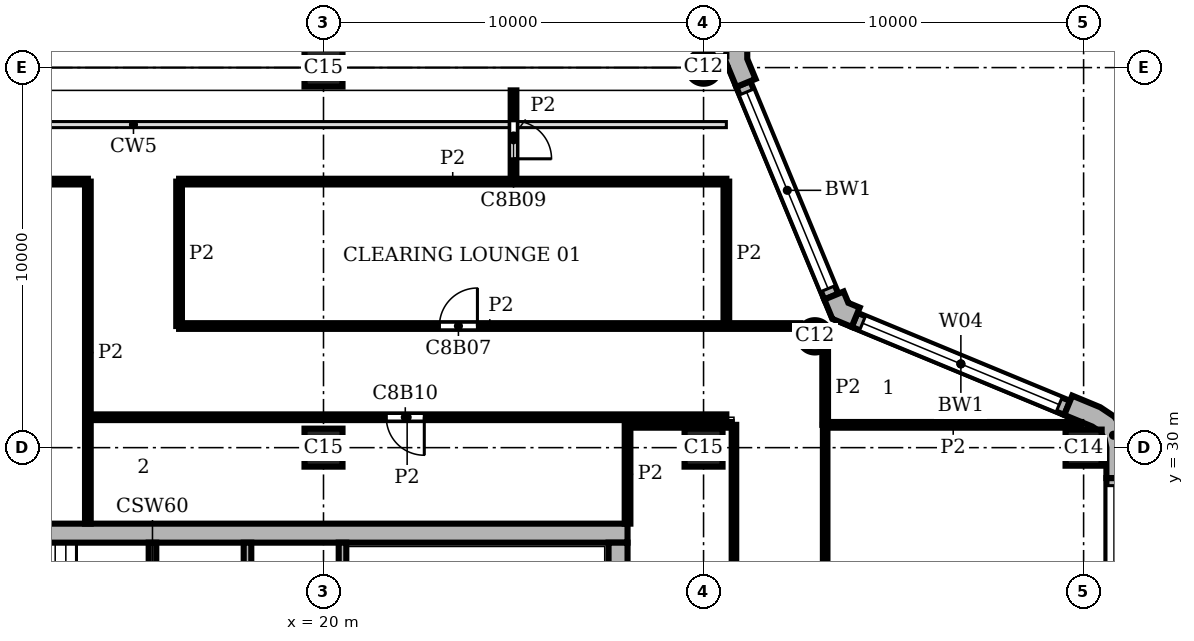
"""IFC4 building model, lengths in metres.
Left out: names, types, materials, properties, quantities, classifications, styles, units other than length and angle.
Written with IfcOpenShell. Run it as: python <this file> out.ifc"""

import sys

from ifc_helpers import new_model, si_unit, direction, frame, frame_2d, origin, origin_2d, place, context, subcontext, project, spatial, polyline, rectangle, circle, outline, extrude, element, fill, save


model = new_model("IFC4")
c1 = context("Model", 3, precision=1e-05, world=origin(), true_north=direction((0.0, 1.0)))
c2 = subcontext(c1, "Body", "Model", "MODEL_VIEW")
j1 = project(units=[si_unit("LENGTHUNIT", "METRE"), si_unit("PLANEANGLEUNIT", "RADIAN")], contexts=[c1])
p1 = place(None, origin())
s1 = spatial("IfcSite", under=j1, at=p1, CompositionType="ELEMENT")
p2 = place(p1, origin())
s2 = spatial("IfcBuilding", under=s1, at=p2, CompositionType="ELEMENT")
p3 = place(p2, frame((0.0, 0.0, 329.4)))
s3 = spatial("IfcBuildingStorey", under=s2, at=p3, CompositionType="ELEMENT", Elevation=329.4)
p4 = place(p3, frame((40.0, 30.0, 0.0), z_axis=(0.0, 0.0, 1.0), x_axis=(1.0, 0.0, 0.0)))
e1 = element("IfcColumn", 1, at=p4, inside=s3, PredefinedType="COLUMN", context=c2, shape_type="SweptSolid", body=[
    extrude(rectangle(XDim=0.95, YDim=0.95, at=origin_2d()), origin(), (0.0, 0.0, 1.0), 3.9),
])
for number, where, z_axis, x_axis in (
    (2, (32.929, 32.929, 0.0), (0.0, 0.0, 1.0), (1.0, 0.0, 0.0)),
    (3, (30.0, 40.0, 0.0), (0.0, 0.0, 1.0), (1.0, 0.0, 0.0)),
):
    element("IfcColumn", number, at=place(p3, frame(where, z_axis=z_axis, x_axis=x_axis)), inside=s3, PredefinedType="COLUMN", context=c2, shape_type="SweptSolid", body=[
        extrude(circle(Radius=0.425, at=origin_2d()), origin(), (0.0, 0.0, 1.0), 3.9),
    ])
for number, where, z_axis, x_axis in (
    (4, (20.0, 30.0, 0.0), (0.0, 0.0, 1.0), (1.0, 0.0, 0.0)),
    (5, (20.0, 40.0, 0.0), (0.0, 0.0, 1.0), (1.0, 0.0, 0.0)),
    (6, (30.0, 30.0, 0.0), (0.0, 0.0, 1.0), (1.0, 0.0, 0.0)),
):
    element("IfcColumn", number, at=place(p3, frame(where, z_axis=z_axis, x_axis=x_axis)), inside=s3, PredefinedType="COLUMN", context=c2, shape_type="SweptSolid", body=[
        extrude(rectangle(XDim=1.0, YDim=1.0, at=origin_2d()), origin(), (0.0, 0.0, 1.0), 3.9),
    ])
p5 = place(p3, frame((27.75, 8.5, 0.0), z_axis=(0.0, 0.0, 1.0), x_axis=(0.0, 1.0, 0.0)))
e7 = element("IfcWall", 7, at=p5, inside=s3, PredefinedType="SHEAR", context=c2, shape_type="SweptSolid", body=[
    extrude(rectangle(XDim=19.0, YDim=0.5, at=frame_2d((9.5, 0.0))), origin(), (0.0, 0.0, 1.0), 3.9),
])
p6 = place(p5, frame((4.95, 0.0, 0.0)))
e8 = element("IfcOpeningElement", 8, at=p6, cuts=e7, PredefinedType="OPENING", context=c2, shape_type="SweptSolid", body=[
    extrude(rectangle(XDim=1.6, YDim=2.1, at=frame_2d((0.8, 1.05))), frame((0.0, 0.26, 0.0), z_axis=(0.0, -1.0, 0.0), x_axis=(1.0, 0.0, 0.0)), (0.0, 0.0, 1.0), 0.52),
])
p7 = place(p3, frame((28.0, 27.75, 0.0), z_axis=(0.0, 0.0, 1.0), x_axis=(-1.0, 0.0, 0.0)))
e9 = element("IfcWall", 9, at=p7, inside=s3, PredefinedType="SHEAR", context=c2, shape_type="SweptSolid", body=[
    extrude(rectangle(XDim=20.0, YDim=0.5, at=frame_2d((10.0, 0.0))), origin(), (0.0, 0.0, 1.0), 3.9),
])
p8 = place(p3, origin())
e10 = element("IfcWall", 10, at=p8, inside=s3, PredefinedType="SOLIDWALL", context=c2, shape_type="SweptSolid", body=[
    extrude(outline(polyline([(41.0, 29.2), (41.15, 29.2), (41.15, 30.0), (41.062, 30.44), (40.813, 30.813), (40.44, 31.062), (39.701, 31.369), (39.644, 31.23), (39.49, 30.861), (40.229, 30.554), (40.424, 30.424), (40.554, 30.229), (40.6, 30.0), (40.6, 29.2), (41.0, 29.2)])), origin(), (0.0, 0.0, 1.0), 3.9),
])
e11 = element("IfcWall", 11, at=p8, inside=s3, PredefinedType="SOLIDWALL", context=c2, shape_type="SweptSolid", body=[
    extrude(outline(polyline([(34.051, 33.547), (34.108, 33.685), (33.809, 33.809), (33.685, 34.108), (33.547, 34.051), (33.177, 33.898), (33.388, 33.388), (33.898, 33.177), (34.051, 33.547)])), origin(), (0.0, 0.0, 1.0), 3.9),
])
e12 = element("IfcWall", 12, at=p8, inside=s3, PredefinedType="SOLIDWALL", context=c2, shape_type="SweptSolid", body=[
    extrude(outline(polyline([(30.62, 39.995), (30.62, 40.071), (30.861, 39.49), (31.23, 39.644), (31.369, 39.701), (31.15, 40.229), (31.15, 40.8), (31.0, 40.8), (30.6, 40.8), (30.6, 40.295), (30.425, 40.295), (30.425, 39.995), (30.62, 39.995)])), origin(), (0.0, 0.0, 1.0), 3.9),
])
p9 = place(p3, frame((40.8, 0.8, 0.0), z_axis=(0.0, 0.0, 1.0), x_axis=(0.0, 1.0, 0.0)))
e13 = element("IfcWall", 13, at=p9, inside=s3, PredefinedType="SOLIDWALL", context=c2, shape_type="SweptSolid", body=[
    extrude(rectangle(XDim=28.4, YDim=0.4, at=frame_2d((14.2, 0.0))), origin(), (0.0, 0.0, 1.0), 3.9),
])
p10 = place(p9, frame((0.2, 0.0, 0.9)))
e14 = element("IfcOpeningElement", 14, at=p10, cuts=e13, PredefinedType="OPENING", context=c2, shape_type="SweptSolid", body=[
    extrude(rectangle(XDim=8.0, YDim=2.35, at=frame_2d((4.0, 1.175))), frame((0.0, 0.21, 0.0), z_axis=(0.0, -1.0, 0.0), x_axis=(1.0, 0.0, 0.0)), (0.0, 0.0, 1.0), 0.42),
])
p11 = place(p9, frame((10.2, 0.0, 0.9)))
e15 = element("IfcOpeningElement", 15, at=p11, cuts=e13, PredefinedType="OPENING", context=c2, shape_type="SweptSolid", body=[
    extrude(rectangle(XDim=8.0, YDim=2.35, at=frame_2d((4.0, 1.175))), frame((0.0, 0.21, 0.0), z_axis=(0.0, -1.0, 0.0), x_axis=(1.0, 0.0, 0.0)), (0.0, 0.0, 1.0), 0.42),
])
p12 = place(p9, frame((20.2, 0.0, 0.9)))
e16 = element("IfcOpeningElement", 16, at=p12, cuts=e13, PredefinedType="OPENING", context=c2, shape_type="SweptSolid", body=[
    extrude(rectangle(XDim=8.0, YDim=2.35, at=frame_2d((4.0, 1.175))), frame((0.0, 0.21, 0.0), z_axis=(0.0, -1.0, 0.0), x_axis=(1.0, 0.0, 0.0)), (0.0, 0.0, 1.0), 0.42),
])
p13 = place(p3, frame((39.567, 31.045, 0.0), z_axis=(0.0, 0.0, 1.0), x_axis=(-0.923891000409, 0.382655745237, 0.0)))
e17 = element("IfcWall", 17, at=p13, inside=s3, PredefinedType="SOLIDWALL", context=c2, shape_type="SweptSolid", body=[
    extrude(rectangle(XDim=6.053, YDim=0.4, at=frame_2d((3.027, 0.0))), origin(), (0.0, 0.0, 1.0), 3.9),
])
p14 = place(p13, frame((0.227, 0.0, 0.9)))
e18 = element("IfcOpeningElement", 18, at=p14, cuts=e17, PredefinedType="OPENING", context=c2, shape_type="SweptSolid", body=[
    extrude(rectangle(XDim=5.6, YDim=2.35, at=frame_2d((2.8, 1.175))), frame((0.0, 0.21, 0.0), z_axis=(0.0, -1.0, 0.0), x_axis=(1.0, 0.0, 0.0)), (0.0, 0.0, 1.0), 0.42),
])
p15 = place(p3, frame((33.362, 33.974, 0.0), z_axis=(0.0, 0.0, 1.0), x_axis=(-0.382655745237, 0.923891000409, 0.0)))
e19 = element("IfcWall", 19, at=p15, inside=s3, PredefinedType="SOLIDWALL", context=c2, shape_type="SweptSolid", body=[
    extrude(rectangle(XDim=6.053, YDim=0.4, at=frame_2d((3.027, 0.0))), origin(), (0.0, 0.0, 1.0), 3.9),
])
p16 = place(p15, frame((0.227, 0.0, 0.9)))
e20 = element("IfcOpeningElement", 20, at=p16, cuts=e19, PredefinedType="OPENING", context=c2, shape_type="SweptSolid", body=[
    extrude(rectangle(XDim=5.6, YDim=2.35, at=frame_2d((2.8, 1.175))), frame((0.0, 0.21, 0.0), z_axis=(0.0, -1.0, 0.0), x_axis=(1.0, 0.0, 0.0)), (0.0, 0.0, 1.0), 0.42),
])
p17 = place(p3, frame((15.5, 23.6, 0.0), z_axis=(0.0, 0.0, 1.0), x_axis=(0.0, 1.0, 0.0)))
e21 = element("IfcWall", 21, at=p17, inside=s3, PredefinedType="SHEAR", context=c2, shape_type="SweptSolid", body=[
    extrude(rectangle(XDim=3.9, YDim=0.2, at=frame_2d((1.95, 0.0))), origin(), (0.0, 0.0, 1.0), 3.45),
])
p18 = place(p3, frame((18.0, 20.0, 0.0), z_axis=(0.0, 0.0, 1.0), x_axis=(0.0, 1.0, 0.0)))
e22 = element("IfcWall", 22, at=p18, inside=s3, PredefinedType="SHEAR", context=c2, shape_type="SweptSolid", body=[
    extrude(rectangle(XDim=7.5, YDim=0.2, at=frame_2d((3.75, 0.0))), origin(), (0.0, 0.0, 1.0), 3.45),
])
p19 = place(p18, frame((1.2, 0.0, 0.0)))
e23 = element("IfcOpeningElement", 23, at=p19, cuts=e22, PredefinedType="OPENING", context=c2, shape_type="SweptSolid", body=[
    extrude(rectangle(XDim=1.2, YDim=2.1, at=frame_2d((0.6, 1.05))), frame((0.0, 0.11, 0.0), z_axis=(0.0, -1.0, 0.0), x_axis=(1.0, 0.0, 0.0)), (0.0, 0.0, 1.0), 0.22),
])
p20 = place(p3, frame((20.5, 23.6, 0.0), z_axis=(0.0, 0.0, 1.0), x_axis=(0.0, 1.0, 0.0)))
e24 = element("IfcWall", 24, at=p20, inside=s3, PredefinedType="SHEAR", context=c2, shape_type="SweptSolid", body=[
    extrude(rectangle(XDim=3.9, YDim=0.2, at=frame_2d((1.95, 0.0))), origin(), (0.0, 0.0, 1.0), 3.45),
])
p21 = place(p3, frame((13.8, 28.0, 0.0), z_axis=(0.0, 0.0, 1.0), x_axis=(0.0, 1.0, 0.0)))
e25 = element("IfcWall", 25, at=p21, inside=s3, PredefinedType="PARTITIONING", context=c2, shape_type="SweptSolid", body=[
    extrude(rectangle(XDim=9.0, YDim=0.15, at=frame_2d((4.5, 0.0))), origin(), (0.0, 0.0, 1.0), 3.45),
])
p22 = place(p3, frame((16.2, 33.2, 0.0), z_axis=(0.0, 0.0, 1.0), x_axis=(0.0, 1.0, 0.0)))
e26 = element("IfcWall", 26, at=p22, inside=s3, PredefinedType="PARTITIONING", context=c2, shape_type="SweptSolid", body=[
    extrude(rectangle(XDim=3.8, YDim=0.15, at=frame_2d((1.9, 0.0))), origin(), (0.0, 0.0, 1.0), 3.45),
])
p23 = place(p3, frame((25.0, 37.0, 0.0), z_axis=(0.0, 0.0, 1.0), x_axis=(0.0, 1.0, 0.0)))
e27 = element("IfcWall", 27, at=p23, inside=s3, PredefinedType="PARTITIONING", context=c2, shape_type="SweptSolid", body=[
    extrude(rectangle(XDim=2.4, YDim=0.15, at=frame_2d((1.2, 0.0))), origin(), (0.0, 0.0, 1.0), 3.45),
])
p24 = place(p23, frame((0.6, 0.0, 0.0)))
e28 = element("IfcOpeningElement", 28, at=p24, cuts=e27, PredefinedType="OPENING", context=c2, shape_type="SweptSolid", body=[
    extrude(rectangle(XDim=1.0, YDim=2.1, at=frame_2d((0.5, 1.05))), frame((0.0, 0.085, 0.0), z_axis=(0.0, -1.0, 0.0), x_axis=(1.0, 0.0, 0.0)), (0.0, 0.0, 1.0), 0.17),
])
p25 = place(p3, frame((28.0, 28.0, 0.0), z_axis=(0.0, 0.0, 1.0), x_axis=(0.0, 1.0, 0.0)))
e29 = element("IfcWall", 29, at=p25, inside=s3, PredefinedType="PARTITIONING", context=c2, shape_type="SweptSolid", body=[
    extrude(rectangle(XDim=2.598, YDim=0.15, at=frame_2d((1.299, 0.0))), origin(), (0.0, 0.0, 1.0), 3.45),
])
p26 = place(p3, frame((30.6, 33.2, 0.0), z_axis=(0.0, 0.0, 1.0), x_axis=(0.0, 1.0, 0.0)))
e30 = element("IfcWall", 30, at=p26, inside=s3, PredefinedType="PARTITIONING", context=c2, shape_type="SweptSolid", body=[
    extrude(rectangle(XDim=3.8, YDim=0.15, at=frame_2d((1.9, 0.0))), origin(), (0.0, 0.0, 1.0), 3.45),
])
p27 = place(p3, frame((33.2, 30.6, 0.0), z_axis=(0.0, 0.0, 1.0), x_axis=(0.0, 1.0, 0.0)))
e31 = element("IfcWall", 31, at=p27, inside=s3, PredefinedType="PARTITIONING", context=c2, shape_type="SweptSolid", body=[
    extrude(rectangle(XDim=1.952, YDim=0.15, at=frame_2d((0.976, 0.0))), origin(), (0.0, 0.0, 1.0), 3.45),
])
p28 = place(p3, frame((28.002, 30.6, 0.0), z_axis=(0.0, 0.0, 1.0), x_axis=(1.0, 0.0, 0.0)))
e32 = element("IfcWall", 32, at=p28, inside=s3, PredefinedType="PARTITIONING", context=c2, shape_type="SweptSolid", body=[
    extrude(rectangle(XDim=2.738, YDim=0.15, at=frame_2d((1.369, 0.0))), origin(), (0.0, 0.0, 1.0), 3.45),
])
p29 = place(p3, frame((33.2, 30.6, 0.0), z_axis=(0.0, 0.0, 1.0), x_axis=(1.0, 0.0, 0.0)))
e33 = element("IfcWall", 33, at=p29, inside=s3, PredefinedType="PARTITIONING", context=c2, shape_type="SweptSolid", body=[
    extrude(rectangle(XDim=6.738, YDim=0.15, at=frame_2d((3.369, 0.0))), origin(), (0.0, 0.0, 1.0), 3.45),
])
p30 = place(p3, frame((13.802, 30.8, 0.0), z_axis=(0.0, 0.0, 1.0), x_axis=(1.0, 0.0, 0.0)))
e34 = element("IfcWall", 34, at=p30, inside=s3, PredefinedType="PARTITIONING", context=c2, shape_type="SweptSolid", body=[
    extrude(rectangle(XDim=16.798, YDim=0.15, at=frame_2d((8.399, 0.0))), origin(), (0.0, 0.0, 1.0), 3.45),
])
p31 = place(p30, frame((7.85, 0.0, 0.0)))
e35 = element("IfcOpeningElement", 35, at=p31, cuts=e34, PredefinedType="OPENING", context=c2, shape_type="SweptSolid", body=[
    extrude(rectangle(XDim=1.0, YDim=2.1, at=frame_2d((0.5, 1.05))), frame((0.0, 0.085, 0.0), z_axis=(0.0, -1.0, 0.0), x_axis=(1.0, 0.0, 0.0)), (0.0, 0.0, 1.0), 0.17),
])
p32 = place(p3, frame((16.2, 33.2, 0.0), z_axis=(0.0, 0.0, 1.0), x_axis=(1.0, 0.0, 0.0)))
e36 = element("IfcWall", 36, at=p32, inside=s3, PredefinedType="PARTITIONING", context=c2, shape_type="SweptSolid", body=[
    extrude(rectangle(XDim=16.352, YDim=0.15, at=frame_2d((8.176, 0.0))), origin(), (0.0, 0.0, 1.0), 3.45),
])
p33 = place(p32, frame((6.85, 0.0, 0.0)))
e37 = element("IfcOpeningElement", 37, at=p33, cuts=e36, PredefinedType="OPENING", context=c2, shape_type="SweptSolid", body=[
    extrude(rectangle(XDim=1.0, YDim=2.1, at=frame_2d((0.5, 1.05))), frame((0.0, 0.085, 0.0), z_axis=(0.0, -1.0, 0.0), x_axis=(1.0, 0.0, 0.0)), (0.0, 0.0, 1.0), 0.17),
])
p34 = place(p3, frame((5.0, 37.0, 0.0), z_axis=(0.0, 0.0, 1.0), x_axis=(1.0, 0.0, 0.0)))
e38 = element("IfcWall", 38, at=p34, inside=s3, PredefinedType="PARTITIONING", context=c2, shape_type="SweptSolid", body=[
    extrude(rectangle(XDim=8.8, YDim=0.15, at=frame_2d((4.4, 0.0))), origin(), (0.0, 0.0, 1.0), 3.45),
])
p35 = place(p34, frame((4.1, 0.0, 0.0)))
e39 = element("IfcOpeningElement", 39, at=p35, cuts=e38, PredefinedType="OPENING", context=c2, shape_type="SweptSolid", body=[
    extrude(rectangle(XDim=1.8, YDim=2.1, at=frame_2d((0.9, 1.05))), frame((0.0, 0.085, 0.0), z_axis=(0.0, -1.0, 0.0), x_axis=(1.0, 0.0, 0.0)), (0.0, 0.0, 1.0), 0.17),
])
p36 = place(p3, frame((16.2, 37.0, 0.0), z_axis=(0.0, 0.0, 1.0), x_axis=(1.0, 0.0, 0.0)))
e40 = element("IfcWall", 40, at=p36, inside=s3, PredefinedType="PARTITIONING", context=c2, shape_type="SweptSolid", body=[
    extrude(rectangle(XDim=14.4, YDim=0.15, at=frame_2d((7.2, 0.0))), origin(), (0.0, 0.0, 1.0), 3.45),
])
p37 = place(p3, frame((30.8, 15.45, 0.0), z_axis=(0.0, 0.0, 1.0), x_axis=(0.0, 1.0, 0.0)))
e41 = element("IfcWall", 41, at=p37, inside=s3, PredefinedType="PARTITIONING", context=c2, shape_type="SweptSolid", body=[
    extrude(rectangle(XDim=15.15, YDim=0.12, at=frame_2d((7.575, 0.0))), origin(), (0.0, 0.0, 1.0), 3.45),
])
p38 = place(p37, frame((7.6, 0.0, 0.0)))
e42 = element("IfcOpeningElement", 42, at=p38, cuts=e41, PredefinedType="OPENING", context=c2, shape_type="SweptSolid", body=[
    extrude(rectangle(XDim=1.0, YDim=2.1, at=frame_2d((0.5, 1.05))), frame((0.0, 0.07, 0.0), z_axis=(0.0, -1.0, 0.0), x_axis=(1.0, 0.0, 0.0)), (0.0, 0.0, 1.0), 0.14),
])
p39 = place(p3, frame((33.2, 8.0, 0.0), z_axis=(0.0, 0.0, 1.0), x_axis=(0.0, 1.0, 0.0)))
e43 = element("IfcWall", 43, at=p39, inside=s3, PredefinedType="PARTITIONING", context=c2, shape_type="SweptSolid", body=[
    extrude(rectangle(XDim=22.6, YDim=0.12, at=frame_2d((11.3, 0.0))), origin(), (0.0, 0.0, 1.0), 3.45),
])
p40 = place(p12, origin())
e44 = element("IfcWindow", 44, at=p40, inside=s3, PartitioningType="SINGLE_PANEL", PredefinedType="WINDOW", context=c2, shape_type="SweptSolid", body=[
    extrude(rectangle(XDim=8.0, YDim=2.35, at=frame_2d((4.0, 1.175))), frame((0.0, 0.16, 0.0), z_axis=(0.0, -1.0, 0.0), x_axis=(1.0, 0.0, 0.0)), (0.0, 0.0, 1.0), 0.06),
])
fill(e16, e44)
p41 = place(p14, origin())
e45 = element("IfcWindow", 45, at=p41, inside=s3, PartitioningType="SINGLE_PANEL", PredefinedType="WINDOW", context=c2, shape_type="SweptSolid", body=[
    extrude(rectangle(XDim=5.6, YDim=2.35, at=frame_2d((2.8, 1.175))), frame((0.0, 0.16, 0.0), z_axis=(0.0, -1.0, 0.0), x_axis=(1.0, 0.0, 0.0)), (0.0, 0.0, 1.0), 0.06),
])
fill(e18, e45)
p42 = place(p16, origin())
e46 = element("IfcWindow", 46, at=p42, inside=s3, PartitioningType="SINGLE_PANEL", PredefinedType="WINDOW", context=c2, shape_type="SweptSolid", body=[
    extrude(rectangle(XDim=5.6, YDim=2.35, at=frame_2d((2.8, 1.175))), frame((0.0, 0.16, 0.0), z_axis=(0.0, -1.0, 0.0), x_axis=(1.0, 0.0, 0.0)), (0.0, 0.0, 1.0), 0.06),
])
fill(e20, e46)
p43 = place(p33, origin())
e47 = element("IfcDoor", 47, at=p43, inside=s3, OperationType="SINGLE_SWING_RIGHT", PredefinedType="DOOR", context=c2, shape_type="SweptSolid", body=[
    extrude(rectangle(XDim=1.0, YDim=2.1, at=frame_2d((0.5, 1.05))), frame((0.0, 0.025, 0.0), z_axis=(0.0, -1.0, 0.0), x_axis=(1.0, 0.0, 0.0)), (0.0, 0.0, 1.0), 0.05),
])
fill(e37, e47)
p44 = place(p24, frame((1.0, 0.0, 0.0), z_axis=(0.0, 0.0, 1.0), x_axis=(-1.0, 0.0, 0.0)))
e48 = element("IfcDoor", 48, at=p44, inside=s3, OperationType="SINGLE_SWING_RIGHT", PredefinedType="DOOR", context=c2, shape_type="SweptSolid", body=[
    extrude(rectangle(XDim=1.0, YDim=2.1, at=frame_2d((0.5, 1.05))), frame((0.0, 0.025, 0.0), z_axis=(0.0, -1.0, 0.0), x_axis=(1.0, 0.0, 0.0)), (0.0, 0.0, 1.0), 0.05),
])
fill(e28, e48)
p45 = place(p31, frame((1.0, 0.0, 0.0), z_axis=(0.0, 0.0, 1.0), x_axis=(-1.0, 0.0, 0.0)))
e49 = element("IfcDoor", 49, at=p45, inside=s3, OperationType="SINGLE_SWING_LEFT", PredefinedType="DOOR", context=c2, shape_type="SweptSolid", body=[
    extrude(rectangle(XDim=1.0, YDim=2.1, at=frame_2d((0.5, 1.05))), frame((0.0, 0.025, 0.0), z_axis=(0.0, -1.0, 0.0), x_axis=(1.0, 0.0, 0.0)), (0.0, 0.0, 1.0), 0.05),
])
fill(e35, e49)
save(model, sys.argv[1])
